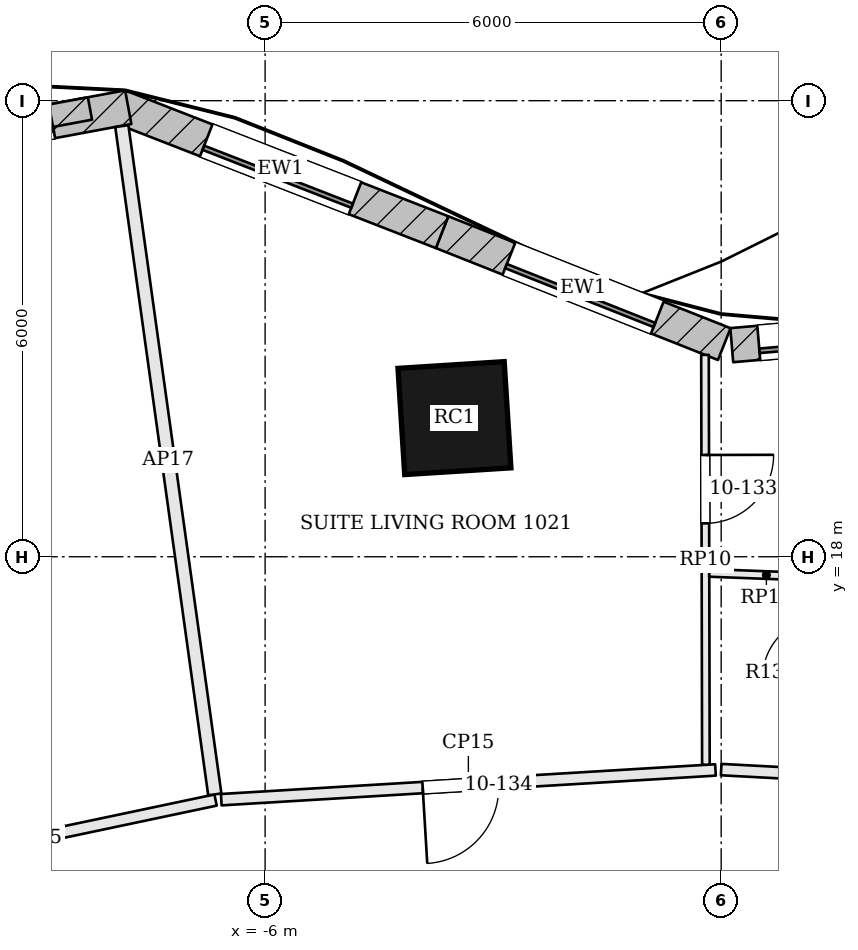
"""IFC4 building model, lengths in metres.
Left out: names, types, materials, properties, quantities, classifications, styles, units other than length and angle.
Written with IfcOpenShell. Run it as: python <this file> out.ifc"""

import sys

from ifc_helpers import new_model, si_unit, direction, frame, frame_2d, origin, origin_2d, place, context, subcontext, project, spatial, rectangle, extrude, element, fill, save


model = new_model("IFC4")
c1 = context("Model", 3, precision=1e-05, world=origin(), true_north=direction((0.0, 1.0)))
c2 = subcontext(c1, "Body", "Model", "MODEL_VIEW")
j1 = project(units=[si_unit("LENGTHUNIT", "METRE"), si_unit("PLANEANGLEUNIT", "RADIAN")], contexts=[c1])
p1 = place(None, origin())
s1 = spatial("IfcSite", under=j1, at=p1, CompositionType="ELEMENT")
p2 = place(p1, origin())
s2 = spatial("IfcBuilding", under=s1, at=p2, CompositionType="ELEMENT")
p3 = place(p2, frame((0.0, 0.0, 51.9)))
s3 = spatial("IfcBuildingStorey", under=s2, at=p3, CompositionType="ELEMENT", Elevation=51.9)
p4 = place(p3, frame((-3.509, 19.824, 0.0), z_axis=(0.0, 0.0, 1.0), x_axis=(-0.9980076013, -0.063093801177, 0.0)))
e1 = element("IfcColumn", 1, at=p4, inside=s3, PredefinedType="COLUMN", context=c2, shape_type="SweptSolid", body=[
    extrude(rectangle(XDim=1.4, YDim=1.4, at=origin_2d()), origin(), (0.0, 0.0, 1.0), 3.6),
])
p5 = place(p3, frame((2.942, 21.024, 0.0), z_axis=(0.0, 0.0, 1.0), x_axis=(-0.996362034459, -0.085221454389, 0.0)))
e2 = element("IfcWall", 2, at=p5, inside=s3, PredefinedType="SOLIDWALL", context=c2, shape_type="SweptSolid", body=[
    extrude(rectangle(XDim=2.813, YDim=0.45, at=frame_2d((1.407, 0.0))), origin(), (0.0, 0.0, 1.0), 3.4),
])
p6 = place(p5, frame((0.357, 0.0, 0.9)))
e3 = element("IfcOpeningElement", 3, at=p6, cuts=e2, PredefinedType="OPENING", context=c2, shape_type="SweptSolid", body=[
    extrude(rectangle(XDim=2.1, YDim=2.0, at=frame_2d((1.05, 1.0))), frame((0.0, 0.235, 0.0), z_axis=(0.0, -1.0, 0.0), x_axis=(1.0, 0.0, 0.0)), (0.0, 0.0, 1.0), 0.47),
])
p7 = place(p3, frame((0.041, 20.798, 0.0), z_axis=(0.0, 0.0, 1.0), x_axis=(-0.929539262027, 0.368723148649, 0.0)))
e4 = element("IfcWall", 4, at=p7, inside=s3, PredefinedType="SOLIDWALL", context=c2, shape_type="SweptSolid", body=[
    extrude(rectangle(XDim=3.995, YDim=0.45, at=frame_2d((1.997, 0.0))), origin(), (0.0, 0.0, 1.0), 3.4),
])
p8 = place(p7, frame((0.947, 0.0, 0.9)))
e5 = element("IfcOpeningElement", 5, at=p8, cuts=e4, PredefinedType="OPENING", context=c2, shape_type="SweptSolid", body=[
    extrude(rectangle(XDim=2.1, YDim=2.0, at=frame_2d((1.05, 1.0))), frame((0.0, 0.235, 0.0), z_axis=(0.0, -1.0, 0.0), x_axis=(1.0, 0.0, 0.0)), (0.0, 0.0, 1.0), 0.47),
])
p9 = place(p3, frame((-3.672, 22.27, 0.0), z_axis=(0.0, 0.0, 1.0), x_axis=(-0.931791503167, 0.36299393194, 0.0)))
e6 = element("IfcWall", 6, at=p9, inside=s3, PredefinedType="SOLIDWALL", context=c2, shape_type="SweptSolid", body=[
    extrude(rectangle(XDim=4.56, YDim=0.45, at=frame_2d((2.28, 0.0))), origin(), (0.0, 0.0, 1.0), 3.4),
])
p10 = place(p9, frame((1.23, 0.0, 0.9)))
e7 = element("IfcOpeningElement", 7, at=p10, cuts=e6, PredefinedType="OPENING", context=c2, shape_type="SweptSolid", body=[
    extrude(rectangle(XDim=2.1, YDim=2.0, at=frame_2d((1.05, 1.0))), frame((0.0, 0.235, 0.0), z_axis=(0.0, -1.0, 0.0), x_axis=(1.0, 0.0, 0.0)), (0.0, 0.0, 1.0), 0.47),
])
p11 = place(p3, frame((-7.801, 23.915, 0.0), z_axis=(0.0, 0.0, 1.0), x_axis=(-0.983186467795, -0.182604407242, 0.0)))
e8 = element("IfcWall", 8, at=p11, inside=s3, PredefinedType="SOLIDWALL", context=c2, shape_type="SweptSolid", body=[
    extrude(rectangle(XDim=4.141, YDim=0.45, at=frame_2d((2.07, 0.0))), origin(), (0.0, 0.0, 1.0), 3.4),
])
p12 = place(p11, frame((1.02, 0.0, 0.9)))
e9 = element("IfcOpeningElement", 9, at=p12, cuts=e8, PredefinedType="OPENING", context=c2, shape_type="SweptSolid", body=[
    extrude(rectangle(XDim=2.1, YDim=2.0, at=frame_2d((1.05, 1.0))), frame((0.0, 0.235, 0.0), z_axis=(0.0, -1.0, 0.0), x_axis=(1.0, 0.0, 0.0)), (0.0, 0.0, 1.0), 0.47),
])
p13 = place(p3, frame((-8.304, 23.897, 3.6), z_axis=(0.0, 0.0, 1.0), x_axis=(-0.983203460001, -0.182512893356, 0.0)))
e10 = element("IfcWall", 10, at=p13, inside=s3, PredefinedType="PARAPET", context=c2, shape_type="SweptSolid", body=[
    extrude(rectangle(XDim=3.529, YDim=0.3, at=frame_2d((1.764, 0.0))), origin(), (0.0, 0.0, 1.0), 1.1),
])
p14 = place(p3, frame((-6.652, 14.8, 0.0), z_axis=(0.0, 0.0, 1.0), x_axis=(-0.978460885149, -0.206432304241, 0.0)))
e11 = element("IfcWall", 11, at=p14, inside=s3, PredefinedType="PARTITIONING", context=c2, shape_type="SweptSolid", body=[
    extrude(rectangle(XDim=4.842, YDim=0.15, at=frame_2d((2.421, 0.0))), origin(), (0.0, 0.0, 1.0), 2.68),
])
p15 = place(p3, frame((-7.885, 23.666, 0.0), z_axis=(0.0, 0.0, 1.0), x_axis=(0.137796980914, -0.990460494947, 0.0)))
e12 = element("IfcWall", 12, at=p15, inside=s3, PredefinedType="PARTITIONING", context=c2, shape_type="SweptSolid", body=[
    extrude(rectangle(XDim=8.876, YDim=0.175, at=frame_2d((4.438, 0.0))), origin(), (0.0, 0.0, 1.0), 2.68),
])
p16 = place(p3, frame((6.281, 14.866, 0.0), z_axis=(0.0, 0.0, 1.0), x_axis=(-0.998587429539, 0.053133281163, 0.0)))
e13 = element("IfcWall", 13, at=p16, inside=s3, PredefinedType="PARTITIONING", context=c2, shape_type="SweptSolid", body=[
    extrude(rectangle(XDim=6.29, YDim=0.15, at=frame_2d((3.145, 0.0))), origin(), (0.0, 0.0, 1.0), 2.68),
])
p17 = place(p3, frame((-0.075, 15.195, 0.0), z_axis=(0.0, 0.0, 1.0), x_axis=(-0.998193444214, -0.060082010028, 0.0)))
e14 = element("IfcWall", 14, at=p17, inside=s3, PredefinedType="PARTITIONING", context=c2, shape_type="SweptSolid", body=[
    extrude(rectangle(XDim=6.514, YDim=0.15, at=frame_2d((3.257, 0.0))), origin(), (0.0, 0.0, 1.0), 2.68),
])
p18 = place(p17, frame((2.859, 0.0, 0.0)))
e15 = element("IfcOpeningElement", 15, at=p18, cuts=e14, PredefinedType="OPENING", context=c2, shape_type="SweptSolid", body=[
    extrude(rectangle(XDim=1.0, YDim=2.1, at=frame_2d((0.5, 1.05))), frame((0.0, 0.085, 0.0), z_axis=(0.0, -1.0, 0.0), x_axis=(1.0, 0.0, 0.0)), (0.0, 0.0, 1.0), 0.17),
])
p19 = place(p3, frame((-0.213, 20.656, 0.0), z_axis=(0.0, 0.0, 1.0), x_axis=(0.002218695015, -0.999997538693, 0.0)))
e16 = element("IfcWall", 16, at=p19, inside=s3, PredefinedType="PARTITIONING", context=c2, shape_type="SweptSolid", body=[
    extrude(rectangle(XDim=5.392, YDim=0.1, at=frame_2d((2.696, 0.0))), origin(), (0.0, 0.0, 1.0), 2.898),
])
p20 = place(p19, frame((1.317, 0.0, 0.0)))
e17 = element("IfcOpeningElement", 17, at=p20, cuts=e16, PredefinedType="OPENING", context=c2, shape_type="SweptSolid", body=[
    extrude(rectangle(XDim=0.9, YDim=2.4, at=frame_2d((0.45, 1.2))), frame((0.0, 0.06, 0.0), z_axis=(0.0, -1.0, 0.0), x_axis=(1.0, 0.0, 0.0)), (0.0, 0.0, 1.0), 0.12),
])
p21 = place(p3, frame((1.346, 17.731, 0.0), z_axis=(0.0, 0.0, 1.0), x_axis=(-0.999296246873, 0.037510145113, 0.0)))
e18 = element("IfcWall", 18, at=p21, inside=s3, PredefinedType="PARTITIONING", context=c2, shape_type="SweptSolid", body=[
    extrude(rectangle(XDim=1.503, YDim=0.1, at=frame_2d((0.752, 0.0))), origin(), (0.0, 0.0, 1.0), 2.898),
])
p22 = place(p6, origin())
e19 = element("IfcWindow", 19, at=p22, inside=s3, PartitioningType="SINGLE_PANEL", PredefinedType="WINDOW", context=c2, shape_type="SweptSolid", body=[
    extrude(rectangle(XDim=2.1, YDim=2.0, at=frame_2d((1.05, 1.0))), frame((0.0, 0.135, 0.0), z_axis=(0.0, -1.0, 0.0), x_axis=(1.0, 0.0, 0.0)), (0.0, 0.0, 1.0), 0.06),
])
fill(e3, e19)
p23 = place(p8, origin())
e20 = element("IfcWindow", 20, at=p23, inside=s3, PartitioningType="SINGLE_PANEL", PredefinedType="WINDOW", context=c2, shape_type="SweptSolid", body=[
    extrude(rectangle(XDim=2.1, YDim=2.0, at=frame_2d((1.05, 1.0))), frame((0.0, 0.135, 0.0), z_axis=(0.0, -1.0, 0.0), x_axis=(1.0, 0.0, 0.0)), (0.0, 0.0, 1.0), 0.06),
])
fill(e5, e20)
p24 = place(p10, origin())
e21 = element("IfcWindow", 21, at=p24, inside=s3, PartitioningType="SINGLE_PANEL", PredefinedType="WINDOW", context=c2, shape_type="SweptSolid", body=[
    extrude(rectangle(XDim=2.1, YDim=2.0, at=frame_2d((1.05, 1.0))), frame((0.0, 0.135, 0.0), z_axis=(0.0, -1.0, 0.0), x_axis=(1.0, 0.0, 0.0)), (0.0, 0.0, 1.0), 0.06),
])
fill(e7, e21)
p25 = place(p12, origin())
e22 = element("IfcWindow", 22, at=p25, inside=s3, PartitioningType="SINGLE_PANEL", PredefinedType="WINDOW", context=c2, shape_type="SweptSolid", body=[
    extrude(rectangle(XDim=2.1, YDim=2.0, at=frame_2d((1.05, 1.0))), frame((0.0, 0.135, 0.0), z_axis=(0.0, -1.0, 0.0), x_axis=(1.0, 0.0, 0.0)), (0.0, 0.0, 1.0), 0.06),
])
fill(e9, e22)
p26 = place(p20, origin())
e23 = element("IfcDoor", 23, at=p26, inside=s3, OperationType="SINGLE_SWING_LEFT", PredefinedType="DOOR", context=c2, shape_type="SweptSolid", body=[
    extrude(rectangle(XDim=0.9, YDim=2.4, at=frame_2d((0.45, 1.2))), frame((0.0, 0.025, 0.0), z_axis=(0.0, -1.0, 0.0), x_axis=(1.0, 0.0, 0.0)), (0.0, 0.0, 1.0), 0.05),
])
fill(e17, e23)
p27 = place(p18, origin())
e24 = element("IfcDoor", 24, at=p27, inside=s3, OperationType="SINGLE_SWING_RIGHT", PredefinedType="DOOR", context=c2, shape_type="SweptSolid", body=[
    extrude(rectangle(XDim=1.0, YDim=2.1, at=frame_2d((0.5, 1.05))), frame((0.0, 0.025, 0.0), z_axis=(0.0, -1.0, 0.0), x_axis=(1.0, 0.0, 0.0)), (0.0, 0.0, 1.0), 0.05),
])
fill(e15, e24)
save(model, sys.argv[1])
